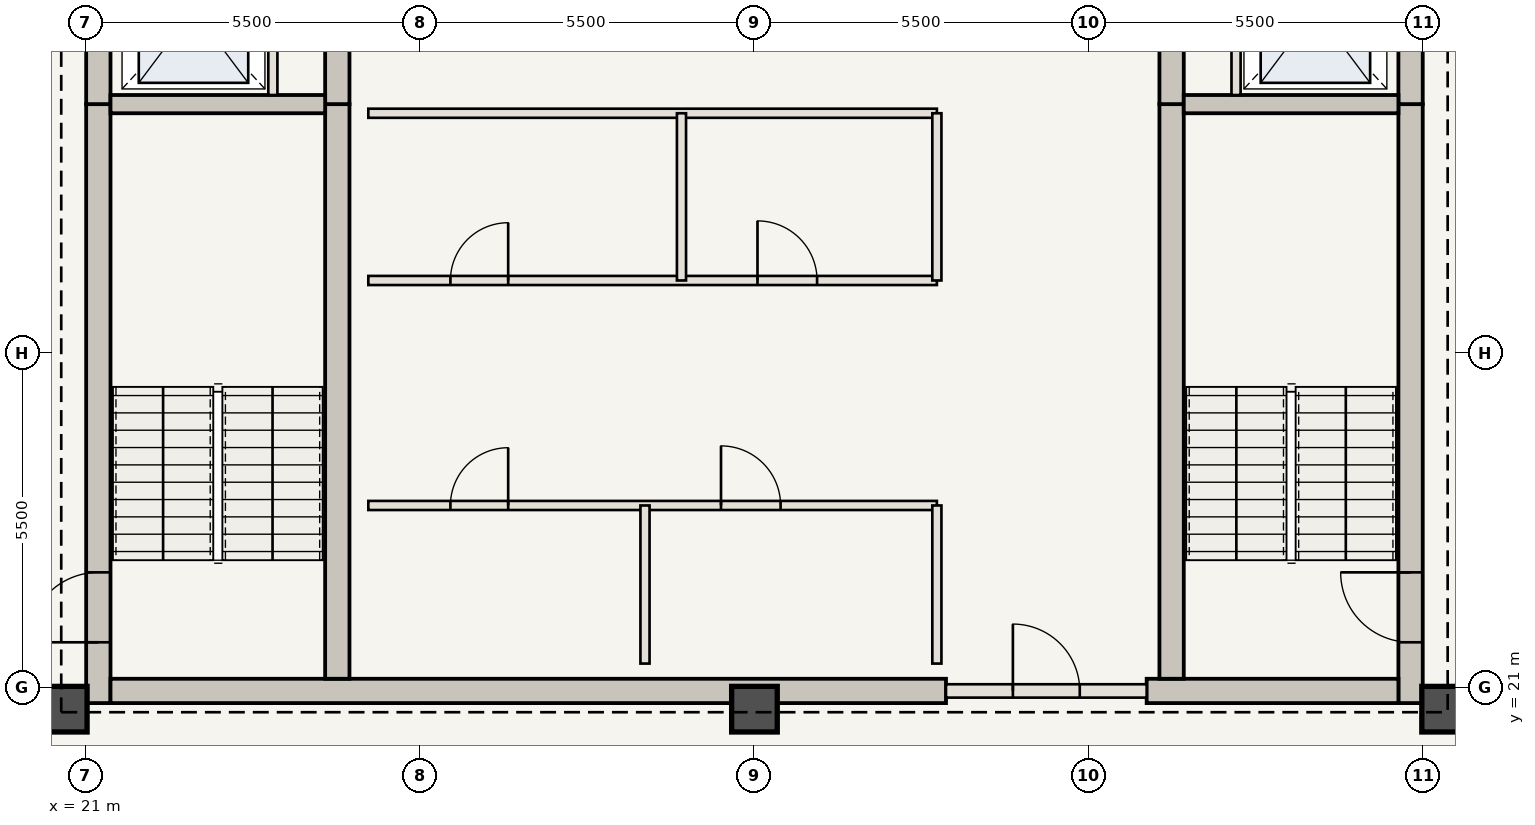
"""IFC4 building model, lengths in metres.
Left out: names, types, materials, properties, quantities, classifications, styles, units other than length and angle.
Written with IfcOpenShell. Run it as: python <this file> out.ifc"""

import sys

from ifc_helpers import new_model, si_unit, direction, frame, frame_2d, origin, origin_2d, place, context, subcontext, project, spatial, rectangle, extrude, element, fill, save


model = new_model("IFC4")
c1 = context("Model", 3, precision=1e-05, world=origin(), true_north=direction((0.0, 1.0)))
c2 = subcontext(c1, "Body", "Model", "MODEL_VIEW")
j1 = project(units=[si_unit("LENGTHUNIT", "METRE"), si_unit("PLANEANGLEUNIT", "RADIAN")], contexts=[c1])
p1 = place(None, origin())
s1 = spatial("IfcSite", under=j1, at=p1, CompositionType="ELEMENT")
p2 = place(p1, origin())
s2 = spatial("IfcBuilding", under=s1, at=p2, CompositionType="ELEMENT")
p3 = place(p2, frame((0.0, 0.0, 266.0)))
s3 = spatial("IfcBuildingStorey", under=s2, at=p3, CompositionType="ELEMENT", Elevation=266.0)
p4 = place(p3, frame((21.21, 20.75, 0.0), z_axis=(0.0, 0.0, 1.0), x_axis=(0.0, 1.0, 0.0)))
e1 = element("IfcWall", 1, at=p4, inside=s3, PredefinedType="SHEAR", context=c2, shape_type="SweptSolid", body=[
    extrude(rectangle(XDim=9.85, YDim=0.4, at=frame_2d((4.925, 0.0))), origin(), (0.0, 0.0, 1.0), 3.85),
])
p5 = place(p4, frame((1.0, 0.0, 0.0)))
e2 = element("IfcOpeningElement", 2, at=p5, cuts=e1, PredefinedType="OPENING", context=c2, shape_type="SweptSolid", body=[
    extrude(rectangle(XDim=1.15, YDim=2.15, at=frame_2d((0.575, 1.075))), frame((0.0, 0.21, 0.0), z_axis=(0.0, -1.0, 0.0), x_axis=(1.0, 0.0, 0.0)), (0.0, 0.0, 1.0), 0.42),
])
p6 = place(p3, frame((21.21, 30.6, 0.0), z_axis=(0.0, 0.0, 1.0), x_axis=(0.0, 1.0, 0.0)))
e3 = element("IfcWall", 3, at=p6, inside=s3, PredefinedType="SHEAR", context=c2, shape_type="SweptSolid", body=[
    extrude(rectangle(XDim=12.6, YDim=0.4, at=frame_2d((6.3, 0.0))), origin(), (0.0, 0.0, 1.0), 3.85),
])
p7 = place(p6, frame((4.2, 0.0, 0.0)))
e4 = element("IfcOpeningElement", 4, at=p7, cuts=e3, PredefinedType="OPENING", context=c2, shape_type="SweptSolid", body=[
    extrude(rectangle(XDim=1.1, YDim=2.15, at=frame_2d((0.55, 1.075))), frame((0.0, 0.21, 0.0), z_axis=(0.0, -1.0, 0.0), x_axis=(1.0, 0.0, 0.0)), (0.0, 0.0, 1.0), 0.42),
])
p8 = place(p6, frame((9.2, 0.0, 0.0)))
e5 = element("IfcOpeningElement", 5, at=p8, cuts=e3, PredefinedType="OPENING", context=c2, shape_type="SweptSolid", body=[
    extrude(rectangle(XDim=0.92, YDim=2.1, at=frame_2d((0.46, 1.05))), frame((0.0, 0.21, 0.0), z_axis=(0.0, -1.0, 0.0), x_axis=(1.0, 0.0, 0.0)), (0.0, 0.0, 1.0), 0.42),
])
p9 = place(p3, frame((42.79, 20.75, 0.0), z_axis=(0.0, 0.0, 1.0), x_axis=(0.0, 1.0, 0.0)))
e6 = element("IfcWall", 6, at=p9, inside=s3, PredefinedType="SHEAR", context=c2, shape_type="SweptSolid", body=[
    extrude(rectangle(XDim=9.85, YDim=0.4, at=frame_2d((4.925, 0.0))), origin(), (0.0, 0.0, 1.0), 3.85),
])
p10 = place(p9, frame((1.0, 0.0, 0.0)))
e7 = element("IfcOpeningElement", 7, at=p10, cuts=e6, PredefinedType="OPENING", context=c2, shape_type="SweptSolid", body=[
    extrude(rectangle(XDim=1.15, YDim=2.15, at=frame_2d((0.575, 1.075))), frame((0.0, 0.21, 0.0), z_axis=(0.0, -1.0, 0.0), x_axis=(1.0, 0.0, 0.0)), (0.0, 0.0, 1.0), 0.42),
])
p11 = place(p3, frame((42.79, 30.6, 0.0), z_axis=(0.0, 0.0, 1.0), x_axis=(0.0, 1.0, 0.0)))
e8 = element("IfcWall", 8, at=p11, inside=s3, PredefinedType="SHEAR", context=c2, shape_type="SweptSolid", body=[
    extrude(rectangle(XDim=12.6, YDim=0.4, at=frame_2d((6.3, 0.0))), origin(), (0.0, 0.0, 1.0), 3.85),
])
p12 = place(p11, frame((4.2, 0.0, 0.0)))
e9 = element("IfcOpeningElement", 9, at=p12, cuts=e8, PredefinedType="OPENING", context=c2, shape_type="SweptSolid", body=[
    extrude(rectangle(XDim=1.1, YDim=2.15, at=frame_2d((0.55, 1.075))), frame((0.0, 0.21, 0.0), z_axis=(0.0, -1.0, 0.0), x_axis=(1.0, 0.0, 0.0)), (0.0, 0.0, 1.0), 0.42),
])
p13 = place(p11, frame((8.4, 0.0, 0.0)))
e10 = element("IfcOpeningElement", 10, at=p13, cuts=e8, PredefinedType="OPENING", context=c2, shape_type="SweptSolid", body=[
    extrude(rectangle(XDim=0.88, YDim=2.1, at=frame_2d((0.44, 1.05))), frame((0.0, 0.21, 0.0), z_axis=(0.0, -1.0, 0.0), x_axis=(1.0, 0.0, 0.0)), (0.0, 0.0, 1.0), 0.42),
])
p14 = place(p11, frame((10.5, 0.0, 0.0)))
e11 = element("IfcOpeningElement", 11, at=p14, cuts=e8, PredefinedType="OPENING", context=c2, shape_type="SweptSolid", body=[
    extrude(rectangle(XDim=0.88, YDim=2.1, at=frame_2d((0.44, 1.05))), frame((0.0, 0.21, 0.0), z_axis=(0.0, -1.0, 0.0), x_axis=(1.0, 0.0, 0.0)), (0.0, 0.0, 1.0), 0.42),
])
p15 = place(p3, frame((21.41, 20.95, 0.0), z_axis=(0.0, 0.0, 1.0), x_axis=(1.0, 0.0, 0.0)))
e12 = element("IfcWall", 12, at=p15, inside=s3, PredefinedType="SHEAR", context=c2, shape_type="SweptSolid", body=[
    extrude(rectangle(XDim=13.74, YDim=0.4, at=frame_2d((6.87, 0.0))), origin(), (0.0, 0.0, 1.0), 3.85),
])
p16 = place(p3, frame((38.45, 20.95, 0.0), z_axis=(0.0, 0.0, 1.0), x_axis=(1.0, 0.0, 0.0)))
e13 = element("IfcWall", 13, at=p16, inside=s3, PredefinedType="SHEAR", context=c2, shape_type="SweptSolid", body=[
    extrude(rectangle(XDim=4.14, YDim=0.4, at=frame_2d((2.07, 0.0))), origin(), (0.0, 0.0, 1.0), 3.85),
])
p17 = place(p3, frame((25.14, 21.15, 0.0), z_axis=(0.0, 0.0, 1.0), x_axis=(0.0, 1.0, 0.0)))
e14 = element("IfcWall", 14, at=p17, inside=s3, PredefinedType="SHEAR", context=c2, shape_type="SweptSolid", body=[
    extrude(rectangle(XDim=9.45, YDim=0.4, at=frame_2d((4.725, 0.0))), origin(), (0.0, 0.0, 1.0), 3.85),
])
p18 = place(p3, frame((25.14, 30.6, 0.0), z_axis=(0.0, 0.0, 1.0), x_axis=(0.0, 1.0, 0.0)))
e15 = element("IfcWall", 15, at=p18, inside=s3, PredefinedType="SHEAR", context=c2, shape_type="SweptSolid", body=[
    extrude(rectangle(XDim=12.2, YDim=0.4, at=frame_2d((6.1, 0.0))), origin(), (0.0, 0.0, 1.0), 3.85),
])
p19 = place(p18, frame((6.25, 0.0, 0.0)))
e16 = element("IfcOpeningElement", 16, at=p19, cuts=e15, PredefinedType="OPENING", context=c2, shape_type="SweptSolid", body=[
    extrude(rectangle(XDim=1.1, YDim=2.15, at=frame_2d((0.55, 1.075))), frame((0.0, 0.21, 0.0), z_axis=(0.0, -1.0, 0.0), x_axis=(1.0, 0.0, 0.0)), (0.0, 0.0, 1.0), 0.42),
])
p20 = place(p3, frame((38.86, 21.15, 0.0), z_axis=(0.0, 0.0, 1.0), x_axis=(0.0, 1.0, 0.0)))
e17 = element("IfcWall", 17, at=p20, inside=s3, PredefinedType="SHEAR", context=c2, shape_type="SweptSolid", body=[
    extrude(rectangle(XDim=9.45, YDim=0.4, at=frame_2d((4.725, 0.0))), origin(), (0.0, 0.0, 1.0), 3.85),
])
p21 = place(p3, frame((38.86, 30.6, 0.0), z_axis=(0.0, 0.0, 1.0), x_axis=(0.0, 1.0, 0.0)))
e18 = element("IfcWall", 18, at=p21, inside=s3, PredefinedType="SHEAR", context=c2, shape_type="SweptSolid", body=[
    extrude(rectangle(XDim=12.2, YDim=0.4, at=frame_2d((6.1, 0.0))), origin(), (0.0, 0.0, 1.0), 3.85),
])
for number, where, z_axis, x_axis in (
    (19, (20.65, 20.65, 0.0), (0.0, 0.0, 1.0), (1.0, 0.0, 0.0)),
    (20, (32.0, 20.65, 0.0), (0.0, 0.0, 1.0), (1.0, 0.0, 0.0)),
    (21, (43.35, 20.65, 0.0), (0.0, 0.0, 1.0), (1.0, 0.0, 0.0)),
):
    element("IfcColumn", number, at=place(p3, frame(where, z_axis=z_axis, x_axis=x_axis)), inside=s3, PredefinedType="COLUMN", context=c2, shape_type="SweptSolid", body=[
        extrude(rectangle(XDim=0.75, YDim=0.75, at=origin_2d()), origin(), (0.0, 0.0, 1.0), 3.85),
    ])
for number, where, z_axis, x_axis in (
    (22, (21.41, 30.6, 0.0), (0.0, 0.0, 1.0), (1.0, 0.0, 0.0)),
    (23, (39.06, 30.6, 0.0), (0.0, 0.0, 1.0), (1.0, 0.0, 0.0)),
):
    element("IfcWall", number, at=place(p3, frame(where, z_axis=z_axis, x_axis=x_axis)), inside=s3, PredefinedType="SHEAR", context=c2, shape_type="SweptSolid", body=[
        extrude(rectangle(XDim=3.53, YDim=0.3, at=frame_2d((1.765, 0.0))), origin(), (0.0, 0.0, 1.0), 3.685),
    ])
for number, where, z_axis, x_axis in (
    (24, (24.08, 30.75, 0.0), (0.0, 0.0, 1.0), (0.0, 1.0, 0.0)),
    (25, (39.92, 30.75, 0.0), (0.0, 0.0, 1.0), (0.0, 1.0, 0.0)),
):
    element("IfcWall", number, at=place(p3, frame(where, z_axis=z_axis, x_axis=x_axis)), inside=s3, PredefinedType="STANDARD", context=c2, shape_type="SweptSolid", body=[
        extrude(rectangle(XDim=2.65, YDim=0.15, at=frame_2d((1.325, 0.0))), origin(), (0.0, 0.0, 1.0), 3.685),
    ])
p22 = place(p3, frame((35.15, 20.95, 0.0), z_axis=(0.0, 0.0, 1.0), x_axis=(1.0, 0.0, 0.0)))
e26 = element("IfcWall", 26, at=p22, inside=s3, PredefinedType="STANDARD", context=c2, shape_type="SweptSolid", body=[
    extrude(rectangle(XDim=3.3, YDim=0.22, at=frame_2d((1.65, 0.0))), origin(), (0.0, 0.0, 1.0), 3.685),
])
p23 = place(p22, frame((1.1, 0.0, 0.0)))
e27 = element("IfcOpeningElement", 27, at=p23, cuts=e26, PredefinedType="OPENING", context=c2, shape_type="SweptSolid", body=[
    extrude(rectangle(XDim=1.1, YDim=2.15, at=frame_2d((0.55, 1.075))), frame((0.0, 0.12, 0.0), z_axis=(0.0, -1.0, 0.0), x_axis=(1.0, 0.0, 0.0)), (0.0, 0.0, 1.0), 0.24),
])
p24 = place(p3, frame((25.65, 24.0, 0.0), z_axis=(0.0, 0.0, 1.0), x_axis=(1.0, 0.0, 0.0)))
e28 = element("IfcWall", 28, at=p24, inside=s3, PredefinedType="STANDARD", context=c2, shape_type="SweptSolid", body=[
    extrude(rectangle(XDim=9.35, YDim=0.15, at=frame_2d((4.675, 0.0))), origin(), (0.0, 0.0, 1.0), 3.685),
])
p25 = place(p24, frame((1.35, 0.0, 0.0)))
e29 = element("IfcOpeningElement", 29, at=p25, cuts=e28, PredefinedType="OPENING", context=c2, shape_type="SweptSolid", body=[
    extrude(rectangle(XDim=0.95, YDim=2.15, at=frame_2d((0.475, 1.075))), frame((0.0, 0.085, 0.0), z_axis=(0.0, -1.0, 0.0), x_axis=(1.0, 0.0, 0.0)), (0.0, 0.0, 1.0), 0.17),
])
p26 = place(p24, frame((5.8, 0.0, 0.0)))
e30 = element("IfcOpeningElement", 30, at=p26, cuts=e28, PredefinedType="OPENING", context=c2, shape_type="SweptSolid", body=[
    extrude(rectangle(XDim=0.98, YDim=2.2, at=frame_2d((0.49, 1.1))), frame((0.0, 0.085, 0.0), z_axis=(0.0, -1.0, 0.0), x_axis=(1.0, 0.0, 0.0)), (0.0, 0.0, 1.0), 0.17),
])
for number, where, z_axis, x_axis in (
    (31, (30.2, 21.4, 0.0), (0.0, 0.0, 1.0), (0.0, 1.0, 0.0)),
    (32, (35.0, 21.4, 0.0), (0.0, 0.0, 1.0), (0.0, 1.0, 0.0)),
):
    element("IfcWall", number, at=place(p3, frame(where, z_axis=z_axis, x_axis=x_axis)), inside=s3, PredefinedType="STANDARD", context=c2, shape_type="SweptSolid", body=[
        extrude(rectangle(XDim=2.6, YDim=0.15, at=frame_2d((1.3, 0.0))), origin(), (0.0, 0.0, 1.0), 3.685),
    ])
p27 = place(p3, frame((25.65, 27.7, 0.0), z_axis=(0.0, 0.0, 1.0), x_axis=(1.0, 0.0, 0.0)))
e33 = element("IfcWall", 33, at=p27, inside=s3, PredefinedType="STANDARD", context=c2, shape_type="SweptSolid", body=[
    extrude(rectangle(XDim=9.35, YDim=0.15, at=frame_2d((4.675, 0.0))), origin(), (0.0, 0.0, 1.0), 3.685),
])
p28 = place(p27, frame((1.35, 0.0, 0.0)))
e34 = element("IfcOpeningElement", 34, at=p28, cuts=e33, PredefinedType="OPENING", context=c2, shape_type="SweptSolid", body=[
    extrude(rectangle(XDim=0.95, YDim=2.15, at=frame_2d((0.475, 1.075))), frame((0.0, 0.085, 0.0), z_axis=(0.0, -1.0, 0.0), x_axis=(1.0, 0.0, 0.0)), (0.0, 0.0, 1.0), 0.17),
])
p29 = place(p27, frame((6.4, 0.0, 0.0)))
e35 = element("IfcOpeningElement", 35, at=p29, cuts=e33, PredefinedType="OPENING", context=c2, shape_type="SweptSolid", body=[
    extrude(rectangle(XDim=0.98, YDim=2.2, at=frame_2d((0.49, 1.1))), frame((0.0, 0.085, 0.0), z_axis=(0.0, -1.0, 0.0), x_axis=(1.0, 0.0, 0.0)), (0.0, 0.0, 1.0), 0.17),
])
p30 = place(p3, frame((25.65, 30.45, 0.0), z_axis=(0.0, 0.0, 1.0), x_axis=(1.0, 0.0, 0.0)))
e36 = element("IfcWall", 36, at=p30, inside=s3, PredefinedType="STANDARD", context=c2, shape_type="SweptSolid", body=[
    extrude(rectangle(XDim=9.35, YDim=0.15, at=frame_2d((4.675, 0.0))), origin(), (0.0, 0.0, 1.0), 3.685),
])
for number, where, z_axis, x_axis in (
    (37, (30.8, 27.7, 0.0), (0.0, 0.0, 1.0), (0.0, 1.0, 0.0)),
    (38, (35.0, 27.7, 0.0), (0.0, 0.0, 1.0), (0.0, 1.0, 0.0)),
):
    element("IfcWall", number, at=place(p3, frame(where, z_axis=z_axis, x_axis=x_axis)), inside=s3, PredefinedType="STANDARD", context=c2, shape_type="SweptSolid", body=[
        extrude(rectangle(XDim=2.75, YDim=0.15, at=frame_2d((1.375, 0.0))), origin(), (0.0, 0.0, 1.0), 3.685),
    ])
p31 = place(p5, origin())
e39 = element("IfcDoor", 39, at=p31, inside=s3, OperationType="SINGLE_SWING_LEFT", PredefinedType="DOOR", context=c2, shape_type="SweptSolid", body=[
    extrude(rectangle(XDim=1.15, YDim=2.15, at=frame_2d((0.575, 1.075))), frame((0.0, 0.025, 0.0), z_axis=(0.0, -1.0, 0.0), x_axis=(1.0, 0.0, 0.0)), (0.0, 0.0, 1.0), 0.05),
])
fill(e2, e39)
p32 = place(p10, origin())
e40 = element("IfcDoor", 40, at=p32, inside=s3, OperationType="SINGLE_SWING_RIGHT", PredefinedType="DOOR", context=c2, shape_type="SweptSolid", body=[
    extrude(rectangle(XDim=1.15, YDim=2.15, at=frame_2d((0.575, 1.075))), frame((0.0, 0.025, 0.0), z_axis=(0.0, -1.0, 0.0), x_axis=(1.0, 0.0, 0.0)), (0.0, 0.0, 1.0), 0.05),
])
fill(e7, e40)
p33 = place(p23, origin())
e41 = element("IfcDoor", 41, at=p33, inside=s3, OperationType="SINGLE_SWING_LEFT", PredefinedType="DOOR", context=c2, shape_type="SweptSolid", body=[
    extrude(rectangle(XDim=1.1, YDim=2.15, at=frame_2d((0.55, 1.075))), frame((0.0, 0.025, 0.0), z_axis=(0.0, -1.0, 0.0), x_axis=(1.0, 0.0, 0.0)), (0.0, 0.0, 1.0), 0.05),
])
fill(e27, e41)
p34 = place(p25, origin())
e42 = element("IfcDoor", 42, at=p34, inside=s3, OperationType="SINGLE_SWING_RIGHT", PredefinedType="DOOR", context=c2, shape_type="SweptSolid", body=[
    extrude(rectangle(XDim=0.95, YDim=2.15, at=frame_2d((0.475, 1.075))), frame((0.0, 0.025, 0.0), z_axis=(0.0, -1.0, 0.0), x_axis=(1.0, 0.0, 0.0)), (0.0, 0.0, 1.0), 0.05),
])
fill(e29, e42)
p35 = place(p26, origin())
e43 = element("IfcDoor", 43, at=p35, inside=s3, OperationType="SINGLE_SWING_LEFT", PredefinedType="DOOR", context=c2, shape_type="SweptSolid", body=[
    extrude(rectangle(XDim=0.98, YDim=2.2, at=frame_2d((0.49, 1.1))), frame((0.0, 0.025, 0.0), z_axis=(0.0, -1.0, 0.0), x_axis=(1.0, 0.0, 0.0)), (0.0, 0.0, 1.0), 0.05),
])
fill(e30, e43)
p36 = place(p28, origin())
e44 = element("IfcDoor", 44, at=p36, inside=s3, OperationType="SINGLE_SWING_RIGHT", PredefinedType="DOOR", context=c2, shape_type="SweptSolid", body=[
    extrude(rectangle(XDim=0.95, YDim=2.15, at=frame_2d((0.475, 1.075))), frame((0.0, 0.025, 0.0), z_axis=(0.0, -1.0, 0.0), x_axis=(1.0, 0.0, 0.0)), (0.0, 0.0, 1.0), 0.05),
])
fill(e34, e44)
p37 = place(p29, origin())
e45 = element("IfcDoor", 45, at=p37, inside=s3, OperationType="SINGLE_SWING_LEFT", PredefinedType="DOOR", context=c2, shape_type="SweptSolid", body=[
    extrude(rectangle(XDim=0.98, YDim=2.2, at=frame_2d((0.49, 1.1))), frame((0.0, 0.025, 0.0), z_axis=(0.0, -1.0, 0.0), x_axis=(1.0, 0.0, 0.0)), (0.0, 0.0, 1.0), 0.05),
])
fill(e35, e45)
save(model, sys.argv[1])
